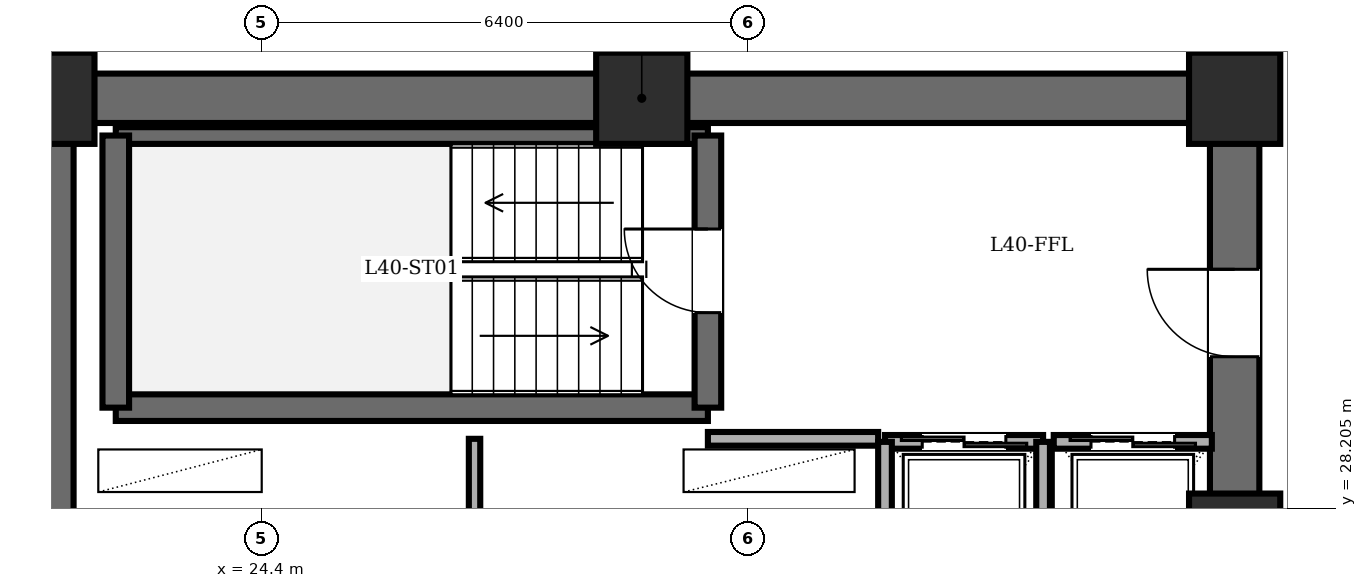
"""IFC4 building model, lengths in metres.
Left out: names, types, materials, properties, quantities, classifications, styles, units other than length and angle.
Written with IfcOpenShell. Run it as: python <this file> out.ifc"""

import sys

from ifc_helpers import new_model, si_unit, direction, frame, frame_2d, origin, origin_2d, place, context, subcontext, project, spatial, rectangle, extrude, element, fill, save


model = new_model("IFC4")
c1 = context("Model", 3, precision=1e-05, world=origin(), true_north=direction((0.0, 1.0)))
c2 = subcontext(c1, "Body", "Model", "MODEL_VIEW")
j1 = project(units=[si_unit("LENGTHUNIT", "METRE"), si_unit("PLANEANGLEUNIT", "RADIAN")], contexts=[c1])
p1 = place(None, origin())
s1 = spatial("IfcSite", under=j1, at=p1, CompositionType="ELEMENT")
p2 = place(p1, origin())
s2 = spatial("IfcBuilding", under=s1, at=p2, CompositionType="ELEMENT")
p3 = place(p2, frame((0.0, 0.0, 154.6)))
s3 = spatial("IfcBuildingStorey", under=s2, at=p3, CompositionType="ELEMENT", Elevation=154.6)
for number, where, z_axis, x_axis in (
    (1, (37.2, 27.8, 0.0), (0.0, 0.0, 1.0), (1.0, 0.0, 0.0)),
    (2, (37.2, 33.6, 0.0), (0.0, 0.0, 1.0), (1.0, 0.0, 0.0)),
    (3, (29.4, 33.6, 0.0), (0.0, 0.0, 1.0), (1.0, 0.0, 0.0)),
    (4, (21.6, 33.6, 0.0), (0.0, 0.0, 1.0), (1.0, 0.0, 0.0)),
):
    element("IfcColumn", number, at=place(p3, frame(where, z_axis=z_axis, x_axis=x_axis)), inside=s3, PredefinedType="COLUMN", context=c2, shape_type="SweptSolid", body=[
        extrude(rectangle(XDim=1.2, YDim=1.2, at=origin_2d()), origin(), (0.0, 0.0, 1.0), 3.6),
    ])
p4 = place(p3, frame((21.6, 14.4, 0.0), z_axis=(0.0, 0.0, 1.0), x_axis=(0.0, 1.0, 0.0)))
e5 = element("IfcWall", 5, at=p4, inside=s3, PredefinedType="SHEAR", context=c2, shape_type="SweptSolid", body=[
    extrude(rectangle(XDim=19.2, YDim=0.65, at=frame_2d((9.6, 0.0))), origin(), (0.0, 0.0, 1.0), 3.4),
])
p5 = place(p3, frame((21.6, 33.6, 0.0), z_axis=(0.0, 0.0, 1.0), x_axis=(1.0, 0.0, 0.0)))
e6 = element("IfcWall", 6, at=p5, inside=s3, PredefinedType="SHEAR", context=c2, shape_type="SweptSolid", body=[
    extrude(rectangle(XDim=15.6, YDim=0.65, at=frame_2d((7.8, 0.0))), origin(), (0.0, 0.0, 1.0), 3.4),
])
p6 = place(p3, frame((37.2, 14.4, 0.0), z_axis=(0.0, 0.0, 1.0), x_axis=(0.0, 1.0, 0.0)))
e7 = element("IfcWall", 7, at=p6, inside=s3, PredefinedType="SHEAR", context=c2, shape_type="SweptSolid", body=[
    extrude(rectangle(XDim=19.2, YDim=0.65, at=frame_2d((9.6, 0.0))), origin(), (0.0, 0.0, 1.0), 3.4),
])
p7 = place(p6, frame((15.8, 0.0, 0.0)))
e8 = element("IfcOpeningElement", 8, at=p7, cuts=e7, PredefinedType="OPENING", context=c2, shape_type="SweptSolid", body=[
    extrude(rectangle(XDim=1.15, YDim=2.15, at=frame_2d((0.575, 1.075))), frame((0.0, 0.335, 0.0), z_axis=(0.0, -1.0, 0.0), x_axis=(1.0, 0.0, 0.0)), (0.0, 0.0, 1.0), 0.67),
])
p8 = place(p6, frame((3.6, 0.0, 0.0)))
e9 = element("IfcOpeningElement", 9, at=p8, cuts=e7, PredefinedType="OPENING", context=c2, shape_type="SweptSolid", body=[
    extrude(rectangle(XDim=1.1, YDim=2.15, at=frame_2d((0.55, 1.075))), frame((0.0, 0.335, 0.0), z_axis=(0.0, -1.0, 0.0), x_axis=(1.0, 0.0, 0.0)), (0.0, 0.0, 1.0), 0.67),
])
p9 = place(p6, frame((8.6, 0.0, 0.0)))
e10 = element("IfcOpeningElement", 10, at=p9, cuts=e7, PredefinedType="OPENING", context=c2, shape_type="SweptSolid", body=[
    extrude(rectangle(XDim=1.3, YDim=2.2, at=frame_2d((0.65, 1.1))), frame((0.0, 0.335, 0.0), z_axis=(0.0, -1.0, 0.0), x_axis=(1.0, 0.0, 0.0)), (0.0, 0.0, 1.0), 0.67),
])
p10 = place(p3, frame((22.48, 29.53, 0.0), z_axis=(0.0, 0.0, 1.0), x_axis=(1.0, 0.0, 0.0)))
e11 = element("IfcWall", 11, at=p10, inside=s3, PredefinedType="SOLIDWALL", context=c2, shape_type="SweptSolid", body=[
    extrude(rectangle(XDim=7.79, YDim=0.35, at=frame_2d((3.895, 0.0))), origin(), (0.0, 0.0, 1.0), 3.4),
])
p11 = place(p3, frame((22.48, 33.11, 0.0), z_axis=(0.0, 0.0, 1.0), x_axis=(1.0, 0.0, 0.0)))
e12 = element("IfcWall", 12, at=p11, inside=s3, PredefinedType="PARTITIONING", context=c2, shape_type="SweptSolid", body=[
    extrude(rectangle(XDim=7.79, YDim=0.22, at=frame_2d((3.895, 0.0))), origin(), (0.0, 0.0, 1.0), 3.4),
])
p12 = place(p3, frame((22.48, 29.53, 0.0), z_axis=(0.0, 0.0, 1.0), x_axis=(0.0, 1.0, 0.0)))
e13 = element("IfcWall", 13, at=p12, inside=s3, PredefinedType="SOLIDWALL", context=c2, shape_type="SweptSolid", body=[
    extrude(rectangle(XDim=3.58, YDim=0.35, at=frame_2d((1.79, 0.0))), origin(), (0.0, 0.0, 1.0), 3.4),
])
p13 = place(p3, frame((30.27, 29.53, 0.0), z_axis=(0.0, 0.0, 1.0), x_axis=(0.0, 1.0, 0.0)))
e14 = element("IfcWall", 14, at=p13, inside=s3, PredefinedType="SOLIDWALL", context=c2, shape_type="SweptSolid", body=[
    extrude(rectangle(XDim=3.58, YDim=0.35, at=frame_2d((1.79, 0.0))), origin(), (0.0, 0.0, 1.0), 3.4),
])
p14 = place(p13, frame((1.25, 0.0, 0.0)))
e15 = element("IfcOpeningElement", 15, at=p14, cuts=e14, PredefinedType="OPENING", context=c2, shape_type="SweptSolid", body=[
    extrude(rectangle(XDim=1.1, YDim=2.15, at=frame_2d((0.55, 1.075))), frame((0.0, 0.185, 0.0), z_axis=(0.0, -1.0, 0.0), x_axis=(1.0, 0.0, 0.0)), (0.0, 0.0, 1.0), 0.37),
])
p15 = place(p3, frame((30.27, 29.12, 0.0), z_axis=(0.0, 0.0, 1.0), x_axis=(1.0, 0.0, 0.0)))
e16 = element("IfcWall", 16, at=p15, inside=s3, PredefinedType="PARTITIONING", context=c2, shape_type="SweptSolid", body=[
    extrude(rectangle(XDim=2.24, YDim=0.18, at=frame_2d((1.12, 0.0))), origin(), (0.0, 0.0, 1.0), 3.4),
])
p16 = place(p3, frame((27.2, 27.6, 0.0), z_axis=(0.0, 0.0, 1.0), x_axis=(0.0, 1.0, 0.0)))
e17 = element("IfcWall", 17, at=p16, inside=s3, PredefinedType="PARTITIONING", context=c2, shape_type="SweptSolid", body=[
    extrude(rectangle(XDim=1.52, YDim=0.15, at=frame_2d((0.76, 0.0))), origin(), (0.0, 0.0, 1.0), 3.4),
])
p17 = place(p3, frame((32.6, 29.08, 0.0), z_axis=(0.0, 0.0, 1.0), x_axis=(1.0, 0.0, 0.0)))
e18 = element("IfcWall", 18, at=p17, inside=s3, PredefinedType="PARTITIONING", context=c2, shape_type="SweptSolid", body=[
    extrude(rectangle(XDim=2.08, YDim=0.18, at=frame_2d((1.04, 0.0))), origin(), (0.0, 0.0, 1.0), 3.4),
])
p18 = place(p17, frame((0.49, 0.0, 0.0)))
e19 = element("IfcOpeningElement", 19, at=p18, cuts=e18, PredefinedType="OPENING", context=c2, shape_type="SweptSolid", body=[
    extrude(rectangle(XDim=1.1, YDim=2.2, at=frame_2d((0.55, 1.1))), frame((0.0, 0.1, 0.0), z_axis=(0.0, -1.0, 0.0), x_axis=(1.0, 0.0, 0.0)), (0.0, 0.0, 1.0), 0.2),
])
for number, where, z_axis, x_axis in (
    (20, (34.68, 26.35, 0.0), (0.0, 0.0, 1.0), (0.0, 1.0, 0.0)),
    (21, (32.6, 29.08, 0.0), (0.0, 0.0, 1.0), (0.0, -1.0, 0.0)),
):
    element("IfcWall", number, at=place(p3, frame(where, z_axis=z_axis, x_axis=x_axis)), inside=s3, PredefinedType="PARTITIONING", context=c2, shape_type="SweptSolid", body=[
        extrude(rectangle(XDim=2.73, YDim=0.18, at=frame_2d((1.365, 0.0))), origin(), (0.0, 0.0, 1.0), 3.4),
    ])
p19 = place(p3, frame((34.82, 29.08, 0.0), z_axis=(0.0, 0.0, 1.0), x_axis=(1.0, 0.0, 0.0)))
e22 = element("IfcWall", 22, at=p19, inside=s3, PredefinedType="PARTITIONING", context=c2, shape_type="SweptSolid", body=[
    extrude(rectangle(XDim=2.08, YDim=0.18, at=frame_2d((1.04, 0.0))), origin(), (0.0, 0.0, 1.0), 3.4),
])
p20 = place(p19, frame((0.49, 0.0, 0.0)))
e23 = element("IfcOpeningElement", 23, at=p20, cuts=e22, PredefinedType="OPENING", context=c2, shape_type="SweptSolid", body=[
    extrude(rectangle(XDim=1.1, YDim=2.2, at=frame_2d((0.55, 1.1))), frame((0.0, 0.1, 0.0), z_axis=(0.0, -1.0, 0.0), x_axis=(1.0, 0.0, 0.0)), (0.0, 0.0, 1.0), 0.2),
])
p21 = place(p14, origin())
e24 = element("IfcDoor", 24, at=p21, inside=s3, OperationType="SINGLE_SWING_RIGHT", PredefinedType="DOOR", context=c2, shape_type="SweptSolid", body=[
    extrude(rectangle(XDim=1.1, YDim=2.15, at=frame_2d((0.55, 1.075))), frame((0.0, 0.025, 0.0), z_axis=(0.0, -1.0, 0.0), x_axis=(1.0, 0.0, 0.0)), (0.0, 0.0, 1.0), 0.05),
])
fill(e15, e24)
p22 = place(p7, origin())
e25 = element("IfcDoor", 25, at=p22, inside=s3, OperationType="SINGLE_SWING_RIGHT", PredefinedType="DOOR", context=c2, shape_type="SweptSolid", body=[
    extrude(rectangle(XDim=1.15, YDim=2.15, at=frame_2d((0.575, 1.075))), frame((0.0, 0.025, 0.0), z_axis=(0.0, -1.0, 0.0), x_axis=(1.0, 0.0, 0.0)), (0.0, 0.0, 1.0), 0.05),
])
fill(e8, e25)
p23 = place(p18, origin())
e26 = element("IfcDoor", 26, at=p23, inside=s3, OperationType="DOUBLE_DOOR_SLIDING", PredefinedType="DOOR", context=c2, shape_type="SweptSolid", body=[
    extrude(rectangle(XDim=1.1, YDim=2.2, at=frame_2d((0.55, 1.1))), frame((0.0, 0.025, 0.0), z_axis=(0.0, -1.0, 0.0), x_axis=(1.0, 0.0, 0.0)), (0.0, 0.0, 1.0), 0.05),
])
fill(e19, e26)
p24 = place(p20, origin())
e27 = element("IfcDoor", 27, at=p24, inside=s3, OperationType="DOUBLE_DOOR_SLIDING", PredefinedType="DOOR", context=c2, shape_type="SweptSolid", body=[
    extrude(rectangle(XDim=1.1, YDim=2.2, at=frame_2d((0.55, 1.1))), frame((0.0, 0.025, 0.0), z_axis=(0.0, -1.0, 0.0), x_axis=(1.0, 0.0, 0.0)), (0.0, 0.0, 1.0), 0.05),
])
fill(e23, e27)
save(model, sys.argv[1])
